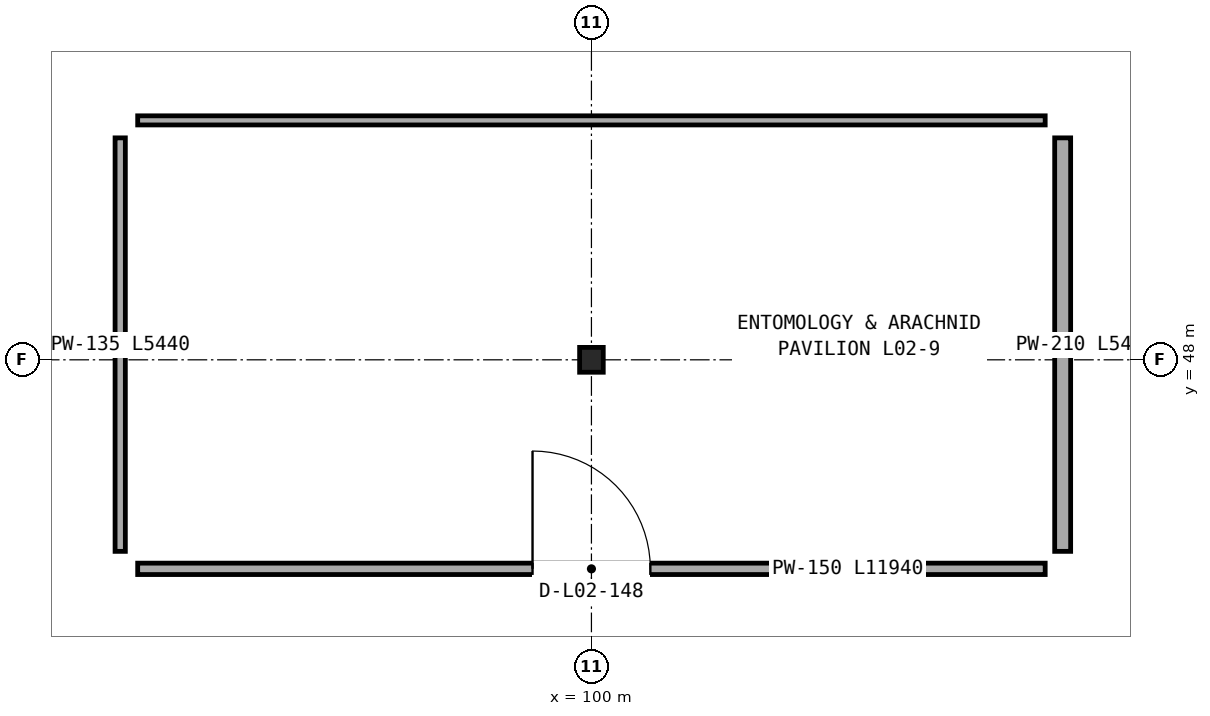
"""IFC4 building model, lengths in metres.
Left out: names, types, materials, properties, quantities, classifications, styles, units other than length and angle.
Written with IfcOpenShell. Run it as: python <this file> out.ifc"""

import sys

from ifc_helpers import new_model, si_unit, direction, frame, frame_2d, origin, origin_2d, place, context, subcontext, project, spatial, rectangle, i_section, extrude, element, fill, save


model = new_model("IFC4")
c1 = context("Model", 3, precision=1e-05, world=origin(), true_north=direction((0.0, 1.0)))
c2 = subcontext(c1, "Body", "Model", "MODEL_VIEW")
j1 = project(units=[si_unit("LENGTHUNIT", "METRE"), si_unit("PLANEANGLEUNIT", "RADIAN")], contexts=[c1])
p1 = place(None, origin())
s1 = spatial("IfcSite", under=j1, at=p1, CompositionType="ELEMENT")
p2 = place(p1, origin())
s2 = spatial("IfcBuilding", under=s1, at=p2, CompositionType="ELEMENT")
p3 = place(p2, frame((0.0, 0.0, 10.1)))
s3 = spatial("IfcBuildingStorey", under=s2, at=p3, CompositionType="ELEMENT", Elevation=10.1)
p4 = place(p3, frame((100.0, 48.0, 0.0), z_axis=(0.0, 0.0, 1.0), x_axis=(1.0, 0.0, 0.0)))
e1 = element("IfcColumn", 1, at=p4, inside=s3, PredefinedType="COLUMN", context=c2, shape_type="SweptSolid", body=[
    extrude(i_section(OverallWidth=0.311, OverallDepth=0.327, WebThickness=0.016, FlangeThickness=0.025, FilletRadius=0.017, at=origin_2d()), origin(), (0.0, 0.0, 1.0), 4.5),
])
p5 = place(p3, frame((105.97, 45.25, 0.0), z_axis=(0.0, 0.0, 1.0), x_axis=(-1.0, 0.0, 0.0)))
e2 = element("IfcWall", 2, at=p5, inside=s3, PredefinedType="PARTITIONING", context=c2, shape_type="SweptSolid", body=[
    extrude(rectangle(XDim=11.94, YDim=0.15, at=frame_2d((5.97, 0.0))), origin(), (0.0, 0.0, 1.0), 3.803),
])
p6 = place(p5, frame((5.195, 0.0, 0.0)))
e3 = element("IfcOpeningElement", 3, at=p6, cuts=e2, PredefinedType="OPENING", context=c2, shape_type="SweptSolid", body=[
    extrude(rectangle(XDim=1.55, YDim=2.58, at=frame_2d((0.775, 1.29))), frame((0.0, 0.085, 0.0), z_axis=(0.0, -1.0, 0.0), x_axis=(1.0, 0.0, 0.0)), (0.0, 0.0, 1.0), 0.17),
])
p7 = place(p3, frame((93.8, 45.48, 0.0), z_axis=(0.0, 0.0, 1.0), x_axis=(0.0, 1.0, 0.0)))
e4 = element("IfcWall", 4, at=p7, inside=s3, PredefinedType="PARTITIONING", context=c2, shape_type="SweptSolid", body=[
    extrude(rectangle(XDim=5.44, YDim=0.135, at=frame_2d((2.72, 0.0))), origin(), (0.0, 0.0, 1.0), 3.613),
])
p8 = place(p3, frame((94.03, 51.15, 0.0), z_axis=(0.0, 0.0, 1.0), x_axis=(1.0, 0.0, 0.0)))
e5 = element("IfcWall", 5, at=p8, inside=s3, PredefinedType="PARTITIONING", context=c2, shape_type="SweptSolid", body=[
    extrude(rectangle(XDim=11.94, YDim=0.12, at=frame_2d((5.97, 0.0))), origin(), (0.0, 0.0, 1.0), 3.763),
])
p9 = place(p3, frame((106.2, 50.92, 0.0), z_axis=(0.0, 0.0, 1.0), x_axis=(0.0, -1.0, 0.0)))
e6 = element("IfcWall", 6, at=p9, inside=s3, PredefinedType="PARTITIONING", context=c2, shape_type="SweptSolid", body=[
    extrude(rectangle(XDim=5.44, YDim=0.21, at=frame_2d((2.72, 0.0))), origin(), (0.0, 0.0, 1.0), 3.613),
])
p10 = place(p6, frame((1.55, 0.0, 0.0), z_axis=(0.0, 0.0, 1.0), x_axis=(-1.0, 0.0, 0.0)))
e7 = element("IfcDoor", 7, at=p10, inside=s3, OperationType="SINGLE_SWING_RIGHT", PredefinedType="DOOR", context=c2, shape_type="SweptSolid", body=[
    extrude(rectangle(XDim=1.55, YDim=2.58, at=frame_2d((0.775, 1.29))), frame((0.0, 0.025, 0.0), z_axis=(0.0, -1.0, 0.0), x_axis=(1.0, 0.0, 0.0)), (0.0, 0.0, 1.0), 0.05),
])
fill(e3, e7)
save(model, sys.argv[1])
